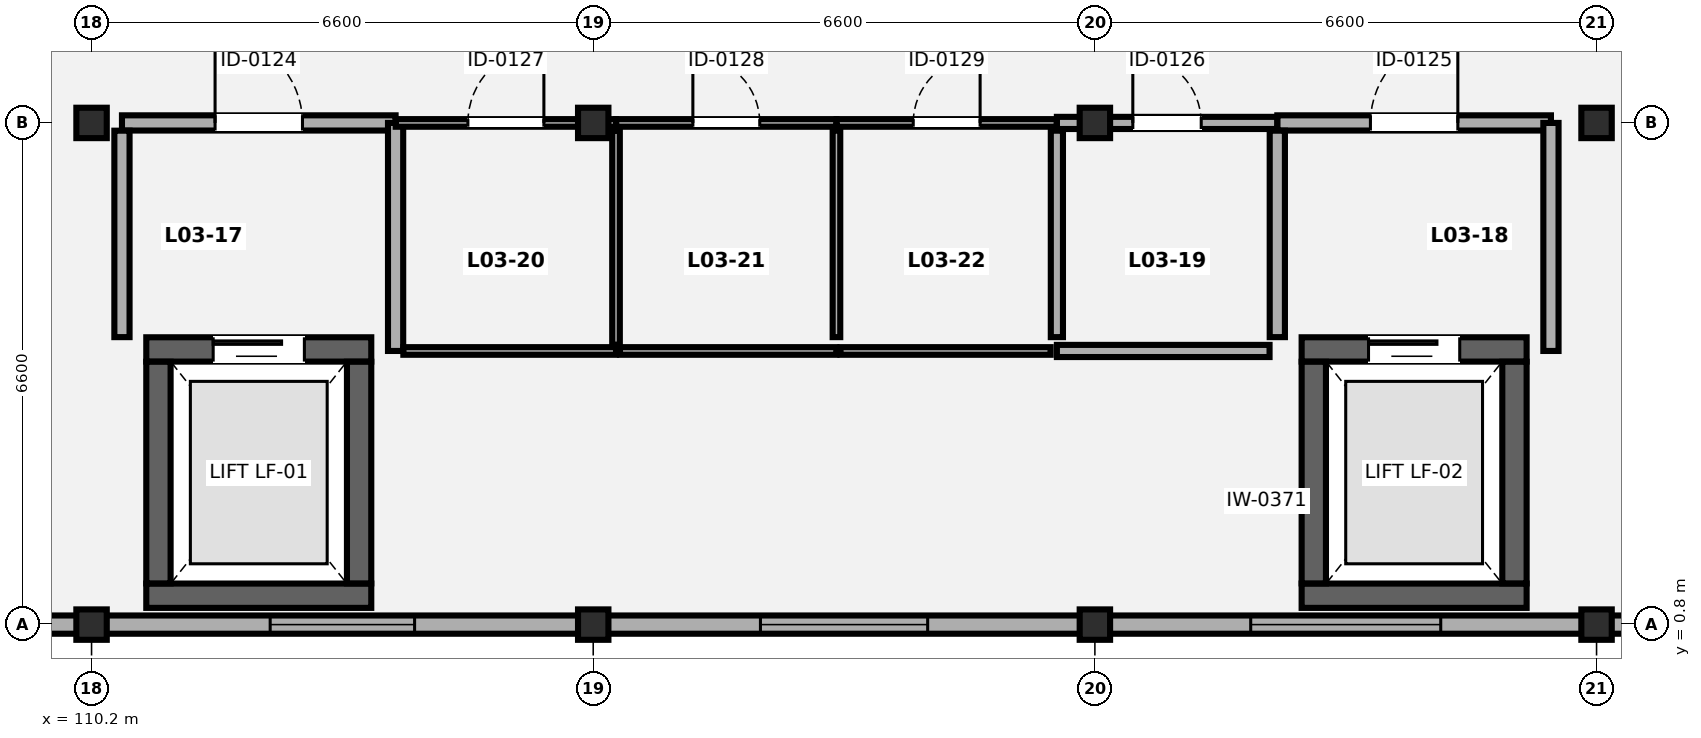
"""IFC4 building model, lengths in metres.
Left out: names, types, materials, properties, quantities, classifications, styles, units other than length and angle.
Written with IfcOpenShell. Run it as: python <this file> out.ifc"""

import sys

from ifc_helpers import new_model, si_unit, direction, frame, frame_2d, origin, origin_2d, place, context, subcontext, project, spatial, rectangle, i_section, extrude, element, fill, save


model = new_model("IFC4")
c1 = context("Model", 3, precision=1e-05, world=origin(), true_north=direction((0.0, 1.0)))
c2 = subcontext(c1, "Body", "Model", "MODEL_VIEW")
j1 = project(units=[si_unit("LENGTHUNIT", "METRE"), si_unit("PLANEANGLEUNIT", "RADIAN")], contexts=[c1])
p1 = place(None, origin())
s1 = spatial("IfcSite", under=j1, at=p1, CompositionType="ELEMENT")
p2 = place(p1, origin())
s2 = spatial("IfcBuilding", under=s1, at=p2, CompositionType="ELEMENT")
p3 = place(p2, frame((0.0, 0.0, 13.3)))
s3 = spatial("IfcBuildingStorey", under=s2, at=p3, CompositionType="ELEMENT", Elevation=13.3)
for number, where, z_axis, x_axis in (
    (1, (110.2, 0.8, 0.0), (0.0, 0.0, 1.0), (1.0, 0.0, 0.0)),
    (2, (110.2, 7.4, 0.0), (0.0, 0.0, 1.0), (1.0, 0.0, 0.0)),
    (3, (116.8, 0.8, 0.0), (0.0, 0.0, 1.0), (1.0, 0.0, 0.0)),
    (4, (116.8, 7.4, 0.0), (0.0, 0.0, 1.0), (1.0, 0.0, 0.0)),
    (5, (123.4, 0.8, 0.0), (0.0, 0.0, 1.0), (1.0, 0.0, 0.0)),
    (6, (123.4, 7.4, 0.0), (0.0, 0.0, 1.0), (1.0, 0.0, 0.0)),
    (7, (130.0, 0.8, 0.0), (0.0, 0.0, 1.0), (1.0, 0.0, 0.0)),
    (8, (130.0, 7.4, 0.0), (0.0, 0.0, 1.0), (1.0, 0.0, 0.0)),
):
    element("IfcColumn", number, at=place(p3, frame(where, z_axis=z_axis, x_axis=x_axis)), inside=s3, PredefinedType="COLUMN", context=c2, shape_type="SweptSolid", body=[
        extrude(i_section(OverallWidth=0.4, OverallDepth=0.4, WebThickness=0.02, FlangeThickness=0.035, FilletRadius=0.016, at=origin_2d()), origin(), (0.0, 0.0, 1.0), 4.2),
    ])
p4 = place(p3, frame((162.002, 0.8, 0.0), z_axis=(0.0, 0.0, 1.0), x_axis=(-1.0, 0.0, 0.0)))
e9 = element("IfcWall", 9, at=p4, inside=s3, PredefinedType="SOLIDWALL", context=c2, shape_type="SweptSolid", body=[
    extrude(rectangle(XDim=58.204, YDim=0.24, at=frame_2d((29.102, 0.0))), origin(), (0.0, 0.0, 1.0), 3.505),
])
p5 = place(p4, frame((54.277, 0.0, 0.85)))
e10 = element("IfcOpeningElement", 10, at=p5, cuts=e9, PredefinedType="OPENING", context=c2, shape_type="SweptSolid", body=[
    extrude(rectangle(XDim=1.65, YDim=1.25, at=frame_2d((0.825, 0.625))), frame((0.0, 0.13, 0.0), z_axis=(0.0, -1.0, 0.0), x_axis=(1.0, 0.0, 0.0)), (0.0, 0.0, 1.0), 0.26),
])
p6 = place(p4, frame((47.552, 0.0, 0.85)))
e11 = element("IfcOpeningElement", 11, at=p6, cuts=e9, PredefinedType="OPENING", context=c2, shape_type="SweptSolid", body=[
    extrude(rectangle(XDim=1.9, YDim=1.25, at=frame_2d((0.95, 0.625))), frame((0.0, 0.13, 0.0), z_axis=(0.0, -1.0, 0.0), x_axis=(1.0, 0.0, 0.0)), (0.0, 0.0, 1.0), 0.26),
])
p7 = place(p4, frame((40.802, 0.0, 0.85)))
e12 = element("IfcOpeningElement", 12, at=p7, cuts=e9, PredefinedType="OPENING", context=c2, shape_type="SweptSolid", body=[
    extrude(rectangle(XDim=2.2, YDim=1.25, at=frame_2d((1.1, 0.625))), frame((0.0, 0.13, 0.0), z_axis=(0.0, -1.0, 0.0), x_axis=(1.0, 0.0, 0.0)), (0.0, 0.0, 1.0), 0.26),
])
p8 = place(p4, frame((34.052, 0.0, 0.85)))
e13 = element("IfcOpeningElement", 13, at=p8, cuts=e9, PredefinedType="OPENING", context=c2, shape_type="SweptSolid", body=[
    extrude(rectangle(XDim=2.5, YDim=1.25, at=frame_2d((1.25, 0.625))), frame((0.0, 0.13, 0.0), z_axis=(0.0, -1.0, 0.0), x_axis=(1.0, 0.0, 0.0)), (0.0, 0.0, 1.0), 0.26),
])
p9 = place(p4, frame((28.252, 0.0, 0.85)))
e14 = element("IfcOpeningElement", 14, at=p9, cuts=e9, PredefinedType="OPENING", context=c2, shape_type="SweptSolid", body=[
    extrude(rectangle(XDim=0.9, YDim=1.35, at=frame_2d((0.45, 0.675))), frame((0.0, 0.13, 0.0), z_axis=(0.0, -1.0, 0.0), x_axis=(1.0, 0.0, 0.0)), (0.0, 0.0, 1.0), 0.26),
])
p10 = place(p4, frame((21.577, 0.0, 0.85)))
e15 = element("IfcOpeningElement", 15, at=p10, cuts=e9, PredefinedType="OPENING", context=c2, shape_type="SweptSolid", body=[
    extrude(rectangle(XDim=1.05, YDim=1.35, at=frame_2d((0.525, 0.675))), frame((0.0, 0.13, 0.0), z_axis=(0.0, -1.0, 0.0), x_axis=(1.0, 0.0, 0.0)), (0.0, 0.0, 1.0), 0.26),
])
p11 = place(p4, frame((14.827, 0.0, 0.85)))
e16 = element("IfcOpeningElement", 16, at=p11, cuts=e9, PredefinedType="OPENING", context=c2, shape_type="SweptSolid", body=[
    extrude(rectangle(XDim=1.35, YDim=1.5, at=frame_2d((0.675, 0.75))), frame((0.0, 0.13, 0.0), z_axis=(0.0, -1.0, 0.0), x_axis=(1.0, 0.0, 0.0)), (0.0, 0.0, 1.0), 0.26),
])
p12 = place(p4, frame((8.102, 0.0, 0.85)))
e17 = element("IfcOpeningElement", 17, at=p12, cuts=e9, PredefinedType="OPENING", context=c2, shape_type="SweptSolid", body=[
    extrude(rectangle(XDim=1.6, YDim=1.5, at=frame_2d((0.8, 0.75))), frame((0.0, 0.13, 0.0), z_axis=(0.0, -1.0, 0.0), x_axis=(1.0, 0.0, 0.0)), (0.0, 0.0, 1.0), 0.26),
])
p13 = place(p4, frame((1.727, 0.0, 0.85)))
e18 = element("IfcOpeningElement", 18, at=p13, cuts=e9, PredefinedType="OPENING", context=c2, shape_type="SweptSolid", body=[
    extrude(rectangle(XDim=1.95, YDim=1.5, at=frame_2d((0.975, 0.75))), frame((0.0, 0.13, 0.0), z_axis=(0.0, -1.0, 0.0), x_axis=(1.0, 0.0, 0.0)), (0.0, 0.0, 1.0), 0.26),
])
p14 = place(p3, frame((110.92, 1.18, 0.0), z_axis=(0.0, 0.0, 1.0), x_axis=(1.0, 0.0, 0.0)))
e19 = element("IfcWall", 19, at=p14, inside=s3, PredefinedType="SHEAR", context=c2, shape_type="SweptSolid", body=[
    extrude(rectangle(XDim=2.96, YDim=0.32, at=frame_2d((1.48, 0.0))), origin(), (0.0, 0.0, 1.0), 4.02),
])
p15 = place(p3, frame((110.92, 4.42, 0.0), z_axis=(0.0, 0.0, 1.0), x_axis=(1.0, 0.0, 0.0)))
e20 = element("IfcWall", 20, at=p15, inside=s3, PredefinedType="SHEAR", context=c2, shape_type="SweptSolid", body=[
    extrude(rectangle(XDim=2.96, YDim=0.32, at=frame_2d((1.48, 0.0))), origin(), (0.0, 0.0, 1.0), 4.02),
])
p16 = place(p15, frame((0.88, 0.0, 0.0)))
e21 = element("IfcOpeningElement", 21, at=p16, cuts=e20, PredefinedType="OPENING", context=c2, shape_type="SweptSolid", body=[
    extrude(rectangle(XDim=1.2, YDim=2.2, at=frame_2d((0.6, 1.1))), frame((0.0, 0.17, 0.0), z_axis=(0.0, -1.0, 0.0), x_axis=(1.0, 0.0, 0.0)), (0.0, 0.0, 1.0), 0.34),
])
for number, where, z_axis, x_axis in (
    (22, (111.08, 1.342, 0.0), (0.0, 0.0, 1.0), (0.0, 1.0, 0.0)),
    (23, (113.72, 1.342, 0.0), (0.0, 0.0, 1.0), (0.0, 1.0, 0.0)),
):
    element("IfcWall", number, at=place(p3, frame(where, z_axis=z_axis, x_axis=x_axis)), inside=s3, PredefinedType="SHEAR", context=c2, shape_type="SweptSolid", body=[
        extrude(rectangle(XDim=2.916, YDim=0.32, at=frame_2d((1.458, 0.0))), origin(), (0.0, 0.0, 1.0), 4.02),
    ])
p17 = place(p3, frame((126.12, 1.18, 0.0), z_axis=(0.0, 0.0, 1.0), x_axis=(1.0, 0.0, 0.0)))
e24 = element("IfcWall", 24, at=p17, inside=s3, PredefinedType="SHEAR", context=c2, shape_type="SweptSolid", body=[
    extrude(rectangle(XDim=2.96, YDim=0.32, at=frame_2d((1.48, 0.0))), origin(), (0.0, 0.0, 1.0), 4.02),
])
p18 = place(p3, frame((126.12, 4.42, 0.0), z_axis=(0.0, 0.0, 1.0), x_axis=(1.0, 0.0, 0.0)))
e25 = element("IfcWall", 25, at=p18, inside=s3, PredefinedType="SHEAR", context=c2, shape_type="SweptSolid", body=[
    extrude(rectangle(XDim=2.96, YDim=0.32, at=frame_2d((1.48, 0.0))), origin(), (0.0, 0.0, 1.0), 4.02),
])
p19 = place(p18, frame((0.88, 0.0, 0.0)))
e26 = element("IfcOpeningElement", 26, at=p19, cuts=e25, PredefinedType="OPENING", context=c2, shape_type="SweptSolid", body=[
    extrude(rectangle(XDim=1.2, YDim=2.2, at=frame_2d((0.6, 1.1))), frame((0.0, 0.17, 0.0), z_axis=(0.0, -1.0, 0.0), x_axis=(1.0, 0.0, 0.0)), (0.0, 0.0, 1.0), 0.34),
])
for number, where, z_axis, x_axis in (
    (27, (126.28, 1.342, 0.0), (0.0, 0.0, 1.0), (0.0, 1.0, 0.0)),
    (28, (128.92, 1.342, 0.0), (0.0, 0.0, 1.0), (0.0, 1.0, 0.0)),
):
    element("IfcWall", number, at=place(p3, frame(where, z_axis=z_axis, x_axis=x_axis)), inside=s3, PredefinedType="SHEAR", context=c2, shape_type="SweptSolid", body=[
        extrude(rectangle(XDim=2.916, YDim=0.32, at=frame_2d((1.458, 0.0))), origin(), (0.0, 0.0, 1.0), 4.02),
    ])
p20 = place(p3, frame((110.6, 7.4, 0.0), z_axis=(0.0, 0.0, 1.0), x_axis=(1.0, 0.0, 0.0)))
e29 = element("IfcWall", 29, at=p20, inside=s3, PredefinedType="SOLIDWALL", context=c2, shape_type="SweptSolid", body=[
    extrude(rectangle(XDim=3.6, YDim=0.2, at=frame_2d((1.8, 0.0))), origin(), (0.0, 0.0, 1.0), 3.293),
])
p21 = place(p20, frame((1.225, 0.0, 0.0)))
e30 = element("IfcOpeningElement", 30, at=p21, cuts=e29, PredefinedType="OPENING", context=c2, shape_type="SweptSolid", body=[
    extrude(rectangle(XDim=1.15, YDim=2.15, at=frame_2d((0.575, 1.075))), frame((0.0, 0.11, 0.0), z_axis=(0.0, -1.0, 0.0), x_axis=(1.0, 0.0, 0.0)), (0.0, 0.0, 1.0), 0.22),
])
p22 = place(p3, frame((110.6, 4.582, 0.0), z_axis=(0.0, 0.0, 1.0), x_axis=(0.0, 1.0, 0.0)))
e31 = element("IfcWall", 31, at=p22, inside=s3, PredefinedType="SOLIDWALL", context=c2, shape_type="SweptSolid", body=[
    extrude(rectangle(XDim=2.716, YDim=0.2, at=frame_2d((1.358, 0.0))), origin(), (0.0, 0.0, 1.0), 4.02),
])
p23 = place(p3, frame((114.2, 4.4, 0.0), z_axis=(0.0, 0.0, 1.0), x_axis=(0.0, 1.0, 0.0)))
e32 = element("IfcWall", 32, at=p23, inside=s3, PredefinedType="SOLIDWALL", context=c2, shape_type="SweptSolid", body=[
    extrude(rectangle(XDim=3.0, YDim=0.2, at=frame_2d((1.5, 0.0))), origin(), (0.0, 0.0, 1.0), 4.02),
])
p24 = place(p3, frame((125.8, 7.4, 0.0), z_axis=(0.0, 0.0, 1.0), x_axis=(1.0, 0.0, 0.0)))
e33 = element("IfcWall", 33, at=p24, inside=s3, PredefinedType="SOLIDWALL", context=c2, shape_type="SweptSolid", body=[
    extrude(rectangle(XDim=3.6, YDim=0.2, at=frame_2d((1.8, 0.0))), origin(), (0.0, 0.0, 1.0), 3.293),
])
p25 = place(p24, frame((1.225, 0.0, 0.0)))
e34 = element("IfcOpeningElement", 34, at=p25, cuts=e33, PredefinedType="OPENING", context=c2, shape_type="SweptSolid", body=[
    extrude(rectangle(XDim=1.15, YDim=2.15, at=frame_2d((0.575, 1.075))), frame((0.0, 0.11, 0.0), z_axis=(0.0, -1.0, 0.0), x_axis=(1.0, 0.0, 0.0)), (0.0, 0.0, 1.0), 0.22),
])
p26 = place(p3, frame((125.8, 4.582, 0.0), z_axis=(0.0, 0.0, 1.0), x_axis=(0.0, 1.0, 0.0)))
e35 = element("IfcWall", 35, at=p26, inside=s3, PredefinedType="SOLIDWALL", context=c2, shape_type="SweptSolid", body=[
    extrude(rectangle(XDim=2.716, YDim=0.2, at=frame_2d((1.358, 0.0))), origin(), (0.0, 0.0, 1.0), 4.02),
])
p27 = place(p3, frame((129.4, 4.4, 0.0), z_axis=(0.0, 0.0, 1.0), x_axis=(0.0, 1.0, 0.0)))
e36 = element("IfcWall", 36, at=p27, inside=s3, PredefinedType="SOLIDWALL", context=c2, shape_type="SweptSolid", body=[
    extrude(rectangle(XDim=3.0, YDim=0.2, at=frame_2d((1.5, 0.0))), origin(), (0.0, 0.0, 1.0), 4.02),
])
p28 = place(p3, frame((122.9, 4.4, 0.0), z_axis=(0.0, 0.0, 1.0), x_axis=(1.0, 0.0, 0.0)))
e37 = element("IfcWall", 37, at=p28, inside=s3, PredefinedType="PARTITIONING", context=c2, shape_type="SweptSolid", body=[
    extrude(rectangle(XDim=2.798, YDim=0.16, at=frame_2d((1.399, 0.0))), origin(), (0.0, 0.0, 1.0), 3.546),
])
p29 = place(p3, frame((122.9, 7.4, 0.0), z_axis=(0.0, 0.0, 1.0), x_axis=(1.0, 0.0, 0.0)))
e38 = element("IfcWall", 38, at=p29, inside=s3, PredefinedType="PARTITIONING", context=c2, shape_type="SweptSolid", body=[
    extrude(rectangle(XDim=2.898, YDim=0.16, at=frame_2d((1.449, 0.0))), origin(), (0.0, 0.0, 1.0), 3.293),
])
p30 = place(p29, frame((0.999, 0.0, 0.0)))
e39 = element("IfcOpeningElement", 39, at=p30, cuts=e38, PredefinedType="OPENING", context=c2, shape_type="SweptSolid", body=[
    extrude(rectangle(XDim=0.9, YDim=2.1, at=frame_2d((0.45, 1.05))), frame((0.0, 0.09, 0.0), z_axis=(0.0, -1.0, 0.0), x_axis=(1.0, 0.0, 0.0)), (0.0, 0.0, 1.0), 0.18),
])
p31 = place(p3, frame((122.9, 4.582, 0.0), z_axis=(0.0, 0.0, 1.0), x_axis=(0.0, 1.0, 0.0)))
e40 = element("IfcWall", 40, at=p31, inside=s3, PredefinedType="PARTITIONING", context=c2, shape_type="SweptSolid", body=[
    extrude(rectangle(XDim=2.716, YDim=0.16, at=frame_2d((1.358, 0.0))), origin(), (0.0, 0.0, 1.0), 4.02),
])
p32 = place(p3, frame((114.302, 4.4, 0.0), z_axis=(0.0, 0.0, 1.0), x_axis=(1.0, 0.0, 0.0)))
e41 = element("IfcWall", 41, at=p32, inside=s3, PredefinedType="PARTITIONING", context=c2, shape_type="SweptSolid", body=[
    extrude(rectangle(XDim=2.798, YDim=0.1, at=frame_2d((1.399, 0.0))), origin(), (0.0, 0.0, 1.0), 4.02),
])
p33 = place(p3, frame((114.202, 7.4, 0.0), z_axis=(0.0, 0.0, 1.0), x_axis=(1.0, 0.0, 0.0)))
e42 = element("IfcWall", 42, at=p33, inside=s3, PredefinedType="PARTITIONING", context=c2, shape_type="SweptSolid", body=[
    extrude(rectangle(XDim=2.898, YDim=0.1, at=frame_2d((1.449, 0.0))), origin(), (0.0, 0.0, 1.0), 3.293),
])
p34 = place(p33, frame((0.949, 0.0, 0.0)))
e43 = element("IfcOpeningElement", 43, at=p34, cuts=e42, PredefinedType="OPENING", context=c2, shape_type="SweptSolid", body=[
    extrude(rectangle(XDim=1.0, YDim=2.1, at=frame_2d((0.5, 1.05))), frame((0.0, 0.06, 0.0), z_axis=(0.0, -1.0, 0.0), x_axis=(1.0, 0.0, 0.0)), (0.0, 0.0, 1.0), 0.12),
])
p35 = place(p3, frame((117.1, 4.482, 0.0), z_axis=(0.0, 0.0, 1.0), x_axis=(0.0, 1.0, 0.0)))
e44 = element("IfcWall", 44, at=p35, inside=s3, PredefinedType="PARTITIONING", context=c2, shape_type="SweptSolid", body=[
    extrude(rectangle(XDim=2.816, YDim=0.1, at=frame_2d((1.408, 0.0))), origin(), (0.0, 0.0, 1.0), 4.02),
])
p36 = place(p3, frame((117.152, 4.4, 0.0), z_axis=(0.0, 0.0, 1.0), x_axis=(1.0, 0.0, 0.0)))
e45 = element("IfcWall", 45, at=p36, inside=s3, PredefinedType="PARTITIONING", context=c2, shape_type="SweptSolid", body=[
    extrude(rectangle(XDim=2.848, YDim=0.1, at=frame_2d((1.424, 0.0))), origin(), (0.0, 0.0, 1.0), 4.02),
])
p37 = place(p3, frame((117.102, 7.4, 0.0), z_axis=(0.0, 0.0, 1.0), x_axis=(1.0, 0.0, 0.0)))
e46 = element("IfcWall", 46, at=p37, inside=s3, PredefinedType="PARTITIONING", context=c2, shape_type="SweptSolid", body=[
    extrude(rectangle(XDim=2.898, YDim=0.1, at=frame_2d((1.449, 0.0))), origin(), (0.0, 0.0, 1.0), 3.293),
])
p38 = place(p37, frame((1.009, 0.0, 0.0)))
e47 = element("IfcOpeningElement", 47, at=p38, cuts=e46, PredefinedType="OPENING", context=c2, shape_type="SweptSolid", body=[
    extrude(rectangle(XDim=0.88, YDim=2.08, at=frame_2d((0.44, 1.04))), frame((0.0, 0.06, 0.0), z_axis=(0.0, -1.0, 0.0), x_axis=(1.0, 0.0, 0.0)), (0.0, 0.0, 1.0), 0.12),
])
p39 = place(p3, frame((120.0, 4.582, 0.0), z_axis=(0.0, 0.0, 1.0), x_axis=(0.0, 1.0, 0.0)))
e48 = element("IfcWall", 48, at=p39, inside=s3, PredefinedType="PARTITIONING", context=c2, shape_type="SweptSolid", body=[
    extrude(rectangle(XDim=2.716, YDim=0.1, at=frame_2d((1.358, 0.0))), origin(), (0.0, 0.0, 1.0), 4.02),
])
p40 = place(p3, frame((120.052, 4.4, 0.0), z_axis=(0.0, 0.0, 1.0), x_axis=(1.0, 0.0, 0.0)))
e49 = element("IfcWall", 49, at=p40, inside=s3, PredefinedType="PARTITIONING", context=c2, shape_type="SweptSolid", body=[
    extrude(rectangle(XDim=2.766, YDim=0.1, at=frame_2d((1.383, 0.0))), origin(), (0.0, 0.0, 1.0), 4.02),
])
p41 = place(p3, frame((120.002, 7.4, 0.0), z_axis=(0.0, 0.0, 1.0), x_axis=(1.0, 0.0, 0.0)))
e50 = element("IfcWall", 50, at=p41, inside=s3, PredefinedType="PARTITIONING", context=c2, shape_type="SweptSolid", body=[
    extrude(rectangle(XDim=2.896, YDim=0.1, at=frame_2d((1.448, 0.0))), origin(), (0.0, 0.0, 1.0), 3.293),
])
p42 = place(p41, frame((1.008, 0.0, 0.0)))
e51 = element("IfcOpeningElement", 51, at=p42, cuts=e50, PredefinedType="OPENING", context=c2, shape_type="SweptSolid", body=[
    extrude(rectangle(XDim=0.88, YDim=2.08, at=frame_2d((0.44, 1.04))), frame((0.0, 0.06, 0.0), z_axis=(0.0, -1.0, 0.0), x_axis=(1.0, 0.0, 0.0)), (0.0, 0.0, 1.0), 0.12),
])
p43 = place(p6, origin())
e52 = element("IfcWindow", 52, at=p43, inside=s3, PartitioningType="SINGLE_PANEL", PredefinedType="WINDOW", context=c2, shape_type="SweptSolid", body=[
    extrude(rectangle(XDim=1.9, YDim=1.25, at=frame_2d((0.95, 0.625))), frame((0.0, 0.03, 0.0), z_axis=(0.0, -1.0, 0.0), x_axis=(1.0, 0.0, 0.0)), (0.0, 0.0, 1.0), 0.06),
])
fill(e11, e52)
p44 = place(p7, origin())
e53 = element("IfcWindow", 53, at=p44, inside=s3, PartitioningType="SINGLE_PANEL", PredefinedType="WINDOW", context=c2, shape_type="SweptSolid", body=[
    extrude(rectangle(XDim=2.2, YDim=1.25, at=frame_2d((1.1, 0.625))), frame((0.0, 0.03, 0.0), z_axis=(0.0, -1.0, 0.0), x_axis=(1.0, 0.0, 0.0)), (0.0, 0.0, 1.0), 0.06),
])
fill(e12, e53)
p45 = place(p8, origin())
e54 = element("IfcWindow", 54, at=p45, inside=s3, PartitioningType="SINGLE_PANEL", PredefinedType="WINDOW", context=c2, shape_type="SweptSolid", body=[
    extrude(rectangle(XDim=2.5, YDim=1.25, at=frame_2d((1.25, 0.625))), frame((0.0, 0.03, 0.0), z_axis=(0.0, -1.0, 0.0), x_axis=(1.0, 0.0, 0.0)), (0.0, 0.0, 1.0), 0.06),
])
fill(e13, e54)
p46 = place(p16, origin())
e55 = element("IfcDoor", 55, at=p46, inside=s3, OperationType="SLIDING_TO_LEFT", PredefinedType="DOOR", context=c2, shape_type="SweptSolid", body=[
    extrude(rectangle(XDim=1.2, YDim=2.2, at=frame_2d((0.6, 1.1))), frame((0.0, 0.025, 0.0), z_axis=(0.0, -1.0, 0.0), x_axis=(1.0, 0.0, 0.0)), (0.0, 0.0, 1.0), 0.05),
])
fill(e21, e55)
p47 = place(p19, origin())
e56 = element("IfcDoor", 56, at=p47, inside=s3, OperationType="SLIDING_TO_LEFT", PredefinedType="DOOR", context=c2, shape_type="SweptSolid", body=[
    extrude(rectangle(XDim=1.2, YDim=2.2, at=frame_2d((0.6, 1.1))), frame((0.0, 0.025, 0.0), z_axis=(0.0, -1.0, 0.0), x_axis=(1.0, 0.0, 0.0)), (0.0, 0.0, 1.0), 0.05),
])
fill(e26, e56)
p48 = place(p21, origin())
e57 = element("IfcDoor", 57, at=p48, inside=s3, OperationType="SINGLE_SWING_LEFT", PredefinedType="DOOR", context=c2, shape_type="SweptSolid", body=[
    extrude(rectangle(XDim=1.15, YDim=2.15, at=frame_2d((0.575, 1.075))), frame((0.0, 0.025, 0.0), z_axis=(0.0, -1.0, 0.0), x_axis=(1.0, 0.0, 0.0)), (0.0, 0.0, 1.0), 0.05),
])
fill(e30, e57)
p49 = place(p25, origin())
e58 = element("IfcDoor", 58, at=p49, inside=s3, OperationType="SINGLE_SWING_RIGHT", PredefinedType="DOOR", context=c2, shape_type="SweptSolid", body=[
    extrude(rectangle(XDim=1.15, YDim=2.15, at=frame_2d((0.575, 1.075))), frame((0.0, 0.025, 0.0), z_axis=(0.0, -1.0, 0.0), x_axis=(1.0, 0.0, 0.0)), (0.0, 0.0, 1.0), 0.05),
])
fill(e34, e58)
p50 = place(p30, origin())
e59 = element("IfcDoor", 59, at=p50, inside=s3, OperationType="SINGLE_SWING_LEFT", PredefinedType="DOOR", context=c2, shape_type="SweptSolid", body=[
    extrude(rectangle(XDim=0.9, YDim=2.1, at=frame_2d((0.45, 1.05))), frame((0.0, 0.025, 0.0), z_axis=(0.0, -1.0, 0.0), x_axis=(1.0, 0.0, 0.0)), (0.0, 0.0, 1.0), 0.05),
])
fill(e39, e59)
p51 = place(p34, origin())
e60 = element("IfcDoor", 60, at=p51, inside=s3, OperationType="SINGLE_SWING_RIGHT", PredefinedType="DOOR", context=c2, shape_type="SweptSolid", body=[
    extrude(rectangle(XDim=1.0, YDim=2.1, at=frame_2d((0.5, 1.05))), frame((0.0, 0.025, 0.0), z_axis=(0.0, -1.0, 0.0), x_axis=(1.0, 0.0, 0.0)), (0.0, 0.0, 1.0), 0.05),
])
fill(e43, e60)
p52 = place(p38, origin())
e61 = element("IfcDoor", 61, at=p52, inside=s3, OperationType="SINGLE_SWING_LEFT", PredefinedType="DOOR", context=c2, shape_type="SweptSolid", body=[
    extrude(rectangle(XDim=0.88, YDim=2.08, at=frame_2d((0.44, 1.04))), frame((0.0, 0.025, 0.0), z_axis=(0.0, -1.0, 0.0), x_axis=(1.0, 0.0, 0.0)), (0.0, 0.0, 1.0), 0.05),
])
fill(e47, e61)
p53 = place(p42, origin())
e62 = element("IfcDoor", 62, at=p53, inside=s3, OperationType="SINGLE_SWING_RIGHT", PredefinedType="DOOR", context=c2, shape_type="SweptSolid", body=[
    extrude(rectangle(XDim=0.88, YDim=2.08, at=frame_2d((0.44, 1.04))), frame((0.0, 0.025, 0.0), z_axis=(0.0, -1.0, 0.0), x_axis=(1.0, 0.0, 0.0)), (0.0, 0.0, 1.0), 0.05),
])
fill(e51, e62)
save(model, sys.argv[1])
